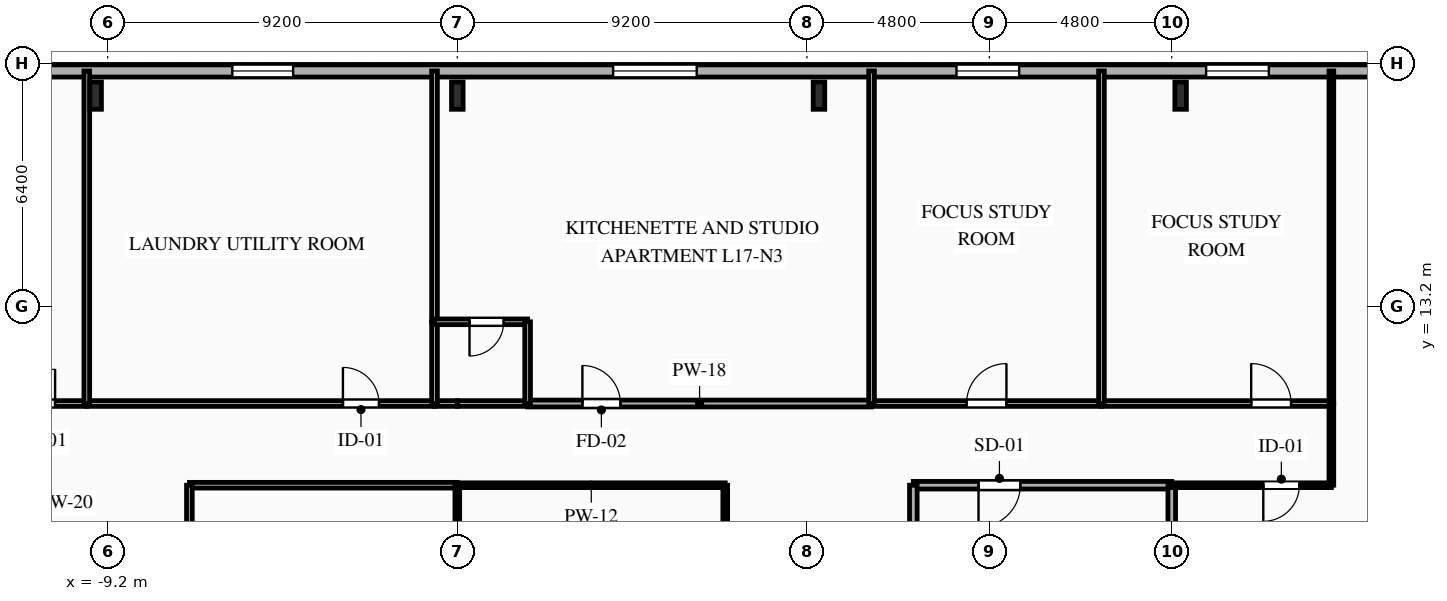
"""IFC4 building model, lengths in metres.
Left out: names, types, materials, properties, quantities, classifications, styles, units other than length and angle.
Written with IfcOpenShell. Run it as: python <this file> out.ifc"""

import sys

from ifc_helpers import new_model, si_unit, direction, frame, frame_2d, origin, origin_2d, place, context, subcontext, project, spatial, rectangle, i_section, extrude, element, fill, save


model = new_model("IFC4")
c1 = context("Model", 3, precision=1e-05, world=origin(), true_north=direction((0.0, 1.0)))
c2 = subcontext(c1, "Body", "Model", "MODEL_VIEW")
j1 = project(units=[si_unit("LENGTHUNIT", "METRE"), si_unit("PLANEANGLEUNIT", "RADIAN")], contexts=[c1])
p1 = place(None, origin())
s1 = spatial("IfcSite", under=j1, at=p1, CompositionType="ELEMENT")
p2 = place(p1, origin())
s2 = spatial("IfcBuilding", under=s1, at=p2, CompositionType="ELEMENT")
p3 = place(p2, frame((0.0, 0.0, 63.85)))
s3 = spatial("IfcBuildingStorey", under=s2, at=p3, CompositionType="ELEMENT", Elevation=63.85)
for number, where, z_axis, x_axis in (
    (1, (19.033, 18.75, 0.0), (0.0, 0.0, 1.0), (1.0, 0.0, 0.0)),
    (2, (9.517, 18.75, 0.0), (0.0, 0.0, 1.0), (1.0, 0.0, 0.0)),
    (3, (0.0, 18.75, 0.0), (0.0, 0.0, 1.0), (1.0, 0.0, 0.0)),
    (4, (-9.517, 18.75, 0.0), (0.0, 0.0, 1.0), (1.0, 0.0, 0.0)),
):
    element("IfcColumn", number, at=place(p3, frame(where, z_axis=z_axis, x_axis=x_axis)), inside=s3, PredefinedType="COLUMN", context=c2, shape_type="SweptSolid", body=[
        extrude(i_section(OverallWidth=0.304, OverallDepth=0.716, WebThickness=0.021, FlangeThickness=0.04, FilletRadius=0.027, at=origin_2d()), origin(), (0.0, 0.0, 1.0), 3.35),
    ])
p4 = place(p3, frame((-29.2, 19.4, 0.0), z_axis=(0.0, 0.0, 1.0), x_axis=(1.0, 0.0, 0.0)))
e5 = element("IfcWall", 5, at=p4, inside=s3, PredefinedType="SOLIDWALL", context=c2, shape_type="SweptSolid", body=[
    extrude(rectangle(XDim=58.4, YDim=0.32, at=frame_2d((29.2, 0.0))), origin(), (0.0, 0.0, 1.0), 3.035),
])
p5 = place(p4, frame((1.255, 0.0, 0.85)))
e6 = element("IfcOpeningElement", 6, at=p5, cuts=e5, PredefinedType="OPENING", context=c2, shape_type="SweptSolid", body=[
    extrude(rectangle(XDim=1.65, YDim=1.85, at=frame_2d((0.825, 0.925))), frame((0.0, 0.17, 0.0), z_axis=(0.0, -1.0, 0.0), x_axis=(1.0, 0.0, 0.0)), (0.0, 0.0, 1.0), 0.34),
])
p6 = place(p4, frame((4.26, 0.0, 0.85)))
e7 = element("IfcOpeningElement", 7, at=p6, cuts=e5, PredefinedType="OPENING", context=c2, shape_type="SweptSolid", body=[
    extrude(rectangle(XDim=1.4, YDim=1.85, at=frame_2d((0.7, 0.925))), frame((0.0, 0.17, 0.0), z_axis=(0.0, -1.0, 0.0), x_axis=(1.0, 0.0, 0.0)), (0.0, 0.0, 1.0), 0.34),
])
p7 = place(p4, frame((8.135, 0.0, 0.85)))
e8 = element("IfcOpeningElement", 8, at=p7, cuts=e5, PredefinedType="OPENING", context=c2, shape_type="SweptSolid", body=[
    extrude(rectangle(XDim=1.65, YDim=1.85, at=frame_2d((0.825, 0.925))), frame((0.0, 0.17, 0.0), z_axis=(0.0, -1.0, 0.0), x_axis=(1.0, 0.0, 0.0)), (0.0, 0.0, 1.0), 0.34),
])
p8 = place(p4, frame((13.575, 0.0, 0.85)))
e9 = element("IfcOpeningElement", 9, at=p8, cuts=e5, PredefinedType="OPENING", context=c2, shape_type="SweptSolid", body=[
    extrude(rectangle(XDim=1.65, YDim=1.85, at=frame_2d((0.825, 0.925))), frame((0.0, 0.17, 0.0), z_axis=(0.0, -1.0, 0.0), x_axis=(1.0, 0.0, 0.0)), (0.0, 0.0, 1.0), 0.34),
])
p9 = place(p4, frame((23.28, 0.0, 0.85)))
e10 = element("IfcOpeningElement", 10, at=p9, cuts=e5, PredefinedType="OPENING", context=c2, shape_type="SweptSolid", body=[
    extrude(rectangle(XDim=1.6, YDim=1.85, at=frame_2d((0.8, 0.925))), frame((0.0, 0.17, 0.0), z_axis=(0.0, -1.0, 0.0), x_axis=(1.0, 0.0, 0.0)), (0.0, 0.0, 1.0), 0.34),
])
p10 = place(p4, frame((33.3, 0.0, 0.85)))
e11 = element("IfcOpeningElement", 11, at=p10, cuts=e5, PredefinedType="OPENING", context=c2, shape_type="SweptSolid", body=[
    extrude(rectangle(XDim=2.2, YDim=1.85, at=frame_2d((1.1, 0.925))), frame((0.0, 0.17, 0.0), z_axis=(0.0, -1.0, 0.0), x_axis=(1.0, 0.0, 0.0)), (0.0, 0.0, 1.0), 0.34),
])
p11 = place(p4, frame((42.335, 0.0, 0.85)))
e12 = element("IfcOpeningElement", 12, at=p11, cuts=e5, PredefinedType="OPENING", context=c2, shape_type="SweptSolid", body=[
    extrude(rectangle(XDim=1.65, YDim=1.85, at=frame_2d((0.825, 0.925))), frame((0.0, 0.17, 0.0), z_axis=(0.0, -1.0, 0.0), x_axis=(1.0, 0.0, 0.0)), (0.0, 0.0, 1.0), 0.34),
])
p12 = place(p4, frame((48.905, 0.0, 0.85)))
e13 = element("IfcOpeningElement", 13, at=p12, cuts=e5, PredefinedType="OPENING", context=c2, shape_type="SweptSolid", body=[
    extrude(rectangle(XDim=1.65, YDim=1.85, at=frame_2d((0.825, 0.925))), frame((0.0, 0.17, 0.0), z_axis=(0.0, -1.0, 0.0), x_axis=(1.0, 0.0, 0.0)), (0.0, 0.0, 1.0), 0.34),
])
p13 = place(p4, frame((54.32, 0.0, 0.85)))
e14 = element("IfcOpeningElement", 14, at=p13, cuts=e5, PredefinedType="OPENING", context=c2, shape_type="SweptSolid", body=[
    extrude(rectangle(XDim=1.6, YDim=1.85, at=frame_2d((0.8, 0.925))), frame((0.0, 0.17, 0.0), z_axis=(0.0, -1.0, 0.0), x_axis=(1.0, 0.0, 0.0)), (0.0, 0.0, 1.0), 0.34),
])
p14 = place(p3, frame((18.8, 8.5, 0.0), z_axis=(0.0, 0.0, 1.0), x_axis=(-1.0, 0.0, 0.0)))
e15 = element("IfcWall", 15, at=p14, inside=s3, PredefinedType="PARTITIONING", context=c2, shape_type="SweptSolid", body=[
    extrude(rectangle(XDim=6.8, YDim=0.2, at=frame_2d((3.4, 0.0))), origin(), (0.0, 0.0, 1.0), 3.035),
])
p15 = place(p14, frame((3.985, 0.0, 0.0)))
e16 = element("IfcOpeningElement", 16, at=p15, cuts=e15, PredefinedType="OPENING", context=c2, shape_type="SweptSolid", body=[
    extrude(rectangle(XDim=1.1, YDim=2.15, at=frame_2d((0.55, 1.075))), frame((0.0, 0.11, 0.0), z_axis=(0.0, -1.0, 0.0), x_axis=(1.0, 0.0, 0.0)), (0.0, 0.0, 1.0), 0.22),
])
p16 = place(p3, frame((12.0, 8.5, 0.0), z_axis=(0.0, 0.0, 1.0), x_axis=(0.0, -1.0, 0.0)))
e17 = element("IfcWall", 17, at=p16, inside=s3, PredefinedType="PARTITIONING", context=c2, shape_type="SweptSolid", body=[
    extrude(rectangle(XDim=2.9, YDim=0.2, at=frame_2d((1.45, 0.0))), origin(), (0.0, 0.0, 1.0), 3.035),
])
p17 = place(p3, frame((18.8, 5.6, 0.0), z_axis=(0.0, 0.0, 1.0), x_axis=(0.0, 1.0, 0.0)))
e18 = element("IfcWall", 18, at=p17, inside=s3, PredefinedType="PARTITIONING", context=c2, shape_type="SweptSolid", body=[
    extrude(rectangle(XDim=2.9, YDim=0.2, at=frame_2d((1.45, 0.0))), origin(), (0.0, 0.0, 1.0), 2.52),
])
p18 = place(p3, frame((-12.1, 10.65, 0.0), z_axis=(0.0, 0.0, 1.0), x_axis=(1.0, 0.0, 0.0)))
e19 = element("IfcWall", 19, at=p18, inside=s3, PredefinedType="PLUMBINGWALL", context=c2, shape_type="SweptSolid", body=[
    extrude(rectangle(XDim=2.35, YDim=0.15, at=frame_2d((1.175, 0.0))), origin(), (0.0, 0.0, 1.0), 3.035),
])
p19 = place(p18, frame((0.616, 0.0, 0.0)))
e20 = element("IfcOpeningElement", 20, at=p19, cuts=e19, PredefinedType="OPENING", context=c2, shape_type="SweptSolid", body=[
    extrude(rectangle(XDim=0.9, YDim=2.1, at=frame_2d((0.45, 1.05))), frame((0.0, 0.085, 0.0), z_axis=(0.0, -1.0, 0.0), x_axis=(1.0, 0.0, 0.0)), (0.0, 0.0, 1.0), 0.17),
])
p20 = place(p3, frame((-9.75, 10.65, 0.0), z_axis=(0.0, 0.0, 1.0), x_axis=(1.0, 0.0, 0.0)))
e21 = element("IfcWall", 21, at=p20, inside=s3, PredefinedType="PARTITIONING", context=c2, shape_type="SweptSolid", body=[
    extrude(rectangle(XDim=9.15, YDim=0.15, at=frame_2d((4.575, 0.0))), origin(), (0.0, 0.0, 1.0), 3.035),
])
p21 = place(p20, frame((6.74, 0.0, 0.0)))
e22 = element("IfcOpeningElement", 22, at=p21, cuts=e21, PredefinedType="OPENING", context=c2, shape_type="SweptSolid", body=[
    extrude(rectangle(XDim=0.95, YDim=2.1, at=frame_2d((0.475, 1.05))), frame((0.0, 0.085, 0.0), z_axis=(0.0, -1.0, 0.0), x_axis=(1.0, 0.0, 0.0)), (0.0, 0.0, 1.0), 0.17),
])
p22 = place(p3, frame((-0.6, 10.65, 0.0), z_axis=(0.0, 0.0, 1.0), x_axis=(1.0, 0.0, 0.0)))
e23 = element("IfcWall", 23, at=p22, inside=s3, PredefinedType="PLUMBINGWALL", context=c2, shape_type="SweptSolid", body=[
    extrude(rectangle(XDim=0.6, YDim=0.15, at=frame_2d((0.3, 0.0))), origin(), (0.0, 0.0, 1.0), 3.035),
])
p23 = place(p3, frame((0.0, 8.5, 0.0), z_axis=(0.0, 0.0, 1.0), x_axis=(-1.0, 0.0, 0.0)))
e24 = element("IfcWall", 24, at=p23, inside=s3, PredefinedType="PARTITIONING", context=c2, shape_type="SweptSolid", body=[
    extrude(rectangle(XDim=7.05, YDim=0.15, at=frame_2d((3.525, 0.0))), origin(), (0.0, 0.0, 1.0), 3.035),
])
p24 = place(p3, frame((23.0, 8.5, 0.0), z_axis=(0.0, 0.0, 1.0), x_axis=(-1.0, 0.0, 0.0)))
e25 = element("IfcWall", 25, at=p24, inside=s3, PredefinedType="PARTITIONING", context=c2, shape_type="SweptSolid", body=[
    extrude(rectangle(XDim=4.2, YDim=0.125, at=frame_2d((2.1, 0.0))), origin(), (0.0, 0.0, 1.0), 3.035),
])
p25 = place(p24, frame((0.841, 0.0, 0.0)))
e26 = element("IfcOpeningElement", 26, at=p25, cuts=e25, PredefinedType="OPENING", context=c2, shape_type="SweptSolid", body=[
    extrude(rectangle(XDim=0.95, YDim=2.1, at=frame_2d((0.475, 1.05))), frame((0.0, 0.073, 0.0), z_axis=(0.0, -1.0, 0.0), x_axis=(1.0, 0.0, 0.0)), (0.0, 0.0, 1.0), 0.145),
])
p26 = place(p3, frame((23.0, 10.65, 0.0), z_axis=(0.0, 0.0, 1.0), x_axis=(0.0, -1.0, 0.0)))
e27 = element("IfcWall", 27, at=p26, inside=s3, PredefinedType="PARTITIONING", context=c2, shape_type="SweptSolid", body=[
    extrude(rectangle(XDim=2.15, YDim=0.125, at=frame_2d((1.075, 0.0))), origin(), (0.0, 0.0, 1.0), 3.035),
])
p27 = place(p3, frame((1.85, 10.65, 0.0), z_axis=(0.0, 0.0, 1.0), x_axis=(1.0, 0.0, 0.0)))
e28 = element("IfcWall", 28, at=p27, inside=s3, PredefinedType="PARTITIONING", context=c2, shape_type="SweptSolid", body=[
    extrude(rectangle(XDim=9.05, YDim=0.18, at=frame_2d((4.525, 0.0))), origin(), (0.0, 0.0, 1.0), 3.035),
])
p28 = place(p27, frame((1.441, 0.0, 0.0)))
e29 = element("IfcOpeningElement", 29, at=p28, cuts=e28, PredefinedType="OPENING", context=c2, shape_type="SweptSolid", body=[
    extrude(rectangle(XDim=1.0, YDim=2.15, at=frame_2d((0.5, 1.075))), frame((0.0, 0.1, 0.0), z_axis=(0.0, -1.0, 0.0), x_axis=(1.0, 0.0, 0.0)), (0.0, 0.0, 1.0), 0.2),
])
p29 = place(p3, frame((0.0, 10.65, 0.0), z_axis=(0.0, 0.0, 1.0), x_axis=(1.0, 0.0, 0.0)))
e30 = element("IfcWall", 30, at=p29, inside=s3, PredefinedType="PLUMBINGWALL", context=c2, shape_type="SweptSolid", body=[
    extrude(rectangle(XDim=1.85, YDim=0.15, at=frame_2d((0.925, 0.0))), origin(), (0.0, 0.0, 1.0), 3.035),
])
p30 = place(p3, frame((10.9, 10.65, 0.0), z_axis=(0.0, 0.0, 1.0), x_axis=(1.0, 0.0, 0.0)))
e31 = element("IfcWall", 31, at=p30, inside=s3, PredefinedType="PARTITIONING", context=c2, shape_type="SweptSolid", body=[
    extrude(rectangle(XDim=6.05, YDim=0.15, at=frame_2d((3.025, 0.0))), origin(), (0.0, 0.0, 1.0), 3.035),
])
p31 = place(p30, frame((2.5, 0.0, 0.0)))
e32 = element("IfcOpeningElement", 32, at=p31, cuts=e31, PredefinedType="OPENING", context=c2, shape_type="SweptSolid", body=[
    extrude(rectangle(XDim=1.05, YDim=2.15, at=frame_2d((0.525, 1.075))), frame((0.0, 0.085, 0.0), z_axis=(0.0, -1.0, 0.0), x_axis=(1.0, 0.0, 0.0)), (0.0, 0.0, 1.0), 0.17),
])
p32 = place(p3, frame((16.95, 10.65, 0.0), z_axis=(0.0, 0.0, 1.0), x_axis=(1.0, 0.0, 0.0)))
e33 = element("IfcWall", 33, at=p32, inside=s3, PredefinedType="PARTITIONING", context=c2, shape_type="SweptSolid", body=[
    extrude(rectangle(XDim=6.05, YDim=0.15, at=frame_2d((3.025, 0.0))), origin(), (0.0, 0.0, 1.0), 3.035),
])
p33 = place(p32, frame((3.94, 0.0, 0.0)))
e34 = element("IfcOpeningElement", 34, at=p33, cuts=e33, PredefinedType="OPENING", context=c2, shape_type="SweptSolid", body=[
    extrude(rectangle(XDim=1.05, YDim=2.15, at=frame_2d((0.525, 1.075))), frame((0.0, 0.085, 0.0), z_axis=(0.0, -1.0, 0.0), x_axis=(1.0, 0.0, 0.0)), (0.0, 0.0, 1.0), 0.17),
])
p34 = place(p3, frame((7.05, 8.5, 0.0), z_axis=(0.0, 0.0, 1.0), x_axis=(-1.0, 0.0, 0.0)))
e35 = element("IfcWall", 35, at=p34, inside=s3, PredefinedType="PARTITIONING", context=c2, shape_type="SweptSolid", body=[
    extrude(rectangle(XDim=7.05, YDim=0.125, at=frame_2d((3.525, 0.0))), origin(), (0.0, 0.0, 1.0), 3.035),
])
p35 = place(p3, frame((-7.05, 8.5, 0.0), z_axis=(0.0, 0.0, 1.0), x_axis=(0.0, -1.0, 0.0)))
e36 = element("IfcWall", 36, at=p35, inside=s3, PredefinedType="PARTITIONING", context=c2, shape_type="SweptSolid", body=[
    extrude(rectangle(XDim=14.1, YDim=0.15, at=frame_2d((7.05, 0.0))), origin(), (0.0, 0.0, 1.0), 3.035),
])
p36 = place(p35, frame((8.074, 0.0, 0.0)))
e37 = element("IfcOpeningElement", 37, at=p36, cuts=e36, PredefinedType="OPENING", context=c2, shape_type="SweptSolid", body=[
    extrude(rectangle(XDim=0.95, YDim=2.1, at=frame_2d((0.475, 1.05))), frame((0.0, 0.085, 0.0), z_axis=(0.0, -1.0, 0.0), x_axis=(1.0, 0.0, 0.0)), (0.0, 0.0, 1.0), 0.17),
])
p37 = place(p3, frame((7.05, -5.6, 0.0), z_axis=(0.0, 0.0, 1.0), x_axis=(0.0, 1.0, 0.0)))
e38 = element("IfcWall", 38, at=p37, inside=s3, PredefinedType="PARTITIONING", context=c2, shape_type="SweptSolid", body=[
    extrude(rectangle(XDim=14.1, YDim=0.125, at=frame_2d((7.05, 0.0))), origin(), (0.0, 0.0, 1.0), 3.035),
])
p38 = place(p37, frame((5.076, 0.0, 0.0)))
e39 = element("IfcOpeningElement", 39, at=p38, cuts=e38, PredefinedType="OPENING", context=c2, shape_type="SweptSolid", body=[
    extrude(rectangle(XDim=0.95, YDim=2.1, at=frame_2d((0.475, 1.05))), frame((0.0, 0.073, 0.0), z_axis=(0.0, -1.0, 0.0), x_axis=(1.0, 0.0, 0.0)), (0.0, 0.0, 1.0), 0.145),
])
p39 = place(p3, frame((23.0, 10.65, 0.0), z_axis=(0.0, 0.0, 1.0), x_axis=(0.0, 1.0, 0.0)))
e40 = element("IfcWall", 40, at=p39, inside=s3, PredefinedType="PARTITIONING", context=c2, shape_type="SweptSolid", body=[
    extrude(rectangle(XDim=8.75, YDim=0.125, at=frame_2d((4.375, 0.0))), origin(), (0.0, 0.0, 1.0), 3.035),
])
p40 = place(p3, frame((-9.75, 19.4, 0.0), z_axis=(0.0, 0.0, 1.0), x_axis=(0.0, -1.0, 0.0)))
e41 = element("IfcWall", 41, at=p40, inside=s3, PredefinedType="PLUMBINGWALL", context=c2, shape_type="SweptSolid", body=[
    extrude(rectangle(XDim=8.75, YDim=0.15, at=frame_2d((4.375, 0.0))), origin(), (0.0, 0.0, 1.0), 3.035),
])
p41 = place(p3, frame((-0.6, 19.4, 0.0), z_axis=(0.0, 0.0, 1.0), x_axis=(0.0, -1.0, 0.0)))
e42 = element("IfcWall", 42, at=p41, inside=s3, PredefinedType="PARTITIONING", context=c2, shape_type="SweptSolid", body=[
    extrude(rectangle(XDim=6.6, YDim=0.15, at=frame_2d((3.3, 0.0))), origin(), (0.0, 0.0, 1.0), 3.035),
])
p42 = place(p3, frame((-0.6, 12.8, 0.0), z_axis=(0.0, 0.0, 1.0), x_axis=(0.0, -1.0, 0.0)))
e43 = element("IfcWall", 43, at=p42, inside=s3, PredefinedType="PLUMBINGWALL", context=c2, shape_type="SweptSolid", body=[
    extrude(rectangle(XDim=2.15, YDim=0.15, at=frame_2d((1.075, 0.0))), origin(), (0.0, 0.0, 1.0), 3.035),
])
p43 = place(p3, frame((1.85, 12.8, 0.0), z_axis=(0.0, 0.0, 1.0), x_axis=(-1.0, 0.0, 0.0)))
e44 = element("IfcWall", 44, at=p43, inside=s3, PredefinedType="PLUMBINGWALL", context=c2, shape_type="SweptSolid", body=[
    extrude(rectangle(XDim=2.45, YDim=0.15, at=frame_2d((1.225, 0.0))), origin(), (0.0, 0.0, 1.0), 3.035),
])
p44 = place(p43, frame((0.629, 0.0, 0.0)))
e45 = element("IfcOpeningElement", 45, at=p44, cuts=e44, PredefinedType="OPENING", context=c2, shape_type="SweptSolid", body=[
    extrude(rectangle(XDim=0.9, YDim=2.1, at=frame_2d((0.45, 1.05))), frame((0.0, 0.085, 0.0), z_axis=(0.0, -1.0, 0.0), x_axis=(1.0, 0.0, 0.0)), (0.0, 0.0, 1.0), 0.17),
])
p45 = place(p3, frame((1.85, 10.65, 0.0), z_axis=(0.0, 0.0, 1.0), x_axis=(0.0, 1.0, 0.0)))
e46 = element("IfcWall", 46, at=p45, inside=s3, PredefinedType="PLUMBINGWALL", context=c2, shape_type="SweptSolid", body=[
    extrude(rectangle(XDim=2.15, YDim=0.15, at=frame_2d((1.075, 0.0))), origin(), (0.0, 0.0, 1.0), 3.035),
])
for number, where, z_axis, x_axis in (
    (47, (10.9, 19.4, 0.0), (0.0, 0.0, 1.0), (0.0, -1.0, 0.0)),
    (48, (16.95, 19.4, 0.0), (0.0, 0.0, 1.0), (0.0, -1.0, 0.0)),
):
    element("IfcWall", number, at=place(p3, frame(where, z_axis=z_axis, x_axis=x_axis)), inside=s3, PredefinedType="PARTITIONING", context=c2, shape_type="SweptSolid", body=[
        extrude(rectangle(XDim=8.75, YDim=0.15, at=frame_2d((4.375, 0.0))), origin(), (0.0, 0.0, 1.0), 3.035),
    ])
p46 = place(p3, frame((0.0, 8.5, 0.0), z_axis=(0.0, 0.0, 1.0), x_axis=(0.0, -1.0, 0.0)))
e49 = element("IfcWall", 49, at=p46, inside=s3, PredefinedType="PARTITIONING", context=c2, shape_type="SweptSolid", body=[
    extrude(rectangle(XDim=14.1, YDim=0.125, at=frame_2d((7.05, 0.0))), origin(), (0.0, 0.0, 1.0), 3.035),
])
p47 = place(p9, origin())
e50 = element("IfcWindow", 50, at=p47, inside=s3, PartitioningType="SINGLE_PANEL", PredefinedType="WINDOW", context=c2, shape_type="SweptSolid", body=[
    extrude(rectangle(XDim=1.6, YDim=1.85, at=frame_2d((0.8, 0.925))), frame((0.0, 0.03, 0.0), z_axis=(0.0, -1.0, 0.0), x_axis=(1.0, 0.0, 0.0)), (0.0, 0.0, 1.0), 0.06),
])
fill(e10, e50)
p48 = place(p10, origin())
e51 = element("IfcWindow", 51, at=p48, inside=s3, PartitioningType="SINGLE_PANEL", PredefinedType="WINDOW", context=c2, shape_type="SweptSolid", body=[
    extrude(rectangle(XDim=2.2, YDim=1.85, at=frame_2d((1.1, 0.925))), frame((0.0, 0.03, 0.0), z_axis=(0.0, -1.0, 0.0), x_axis=(1.0, 0.0, 0.0)), (0.0, 0.0, 1.0), 0.06),
])
fill(e11, e51)
p49 = place(p11, origin())
e52 = element("IfcWindow", 52, at=p49, inside=s3, PartitioningType="SINGLE_PANEL", PredefinedType="WINDOW", context=c2, shape_type="SweptSolid", body=[
    extrude(rectangle(XDim=1.65, YDim=1.85, at=frame_2d((0.825, 0.925))), frame((0.0, 0.03, 0.0), z_axis=(0.0, -1.0, 0.0), x_axis=(1.0, 0.0, 0.0)), (0.0, 0.0, 1.0), 0.06),
])
fill(e12, e52)
p50 = place(p12, origin())
e53 = element("IfcWindow", 53, at=p50, inside=s3, PartitioningType="SINGLE_PANEL", PredefinedType="WINDOW", context=c2, shape_type="SweptSolid", body=[
    extrude(rectangle(XDim=1.65, YDim=1.85, at=frame_2d((0.825, 0.925))), frame((0.0, 0.03, 0.0), z_axis=(0.0, -1.0, 0.0), x_axis=(1.0, 0.0, 0.0)), (0.0, 0.0, 1.0), 0.06),
])
fill(e13, e53)
p51 = place(p15, origin())
e54 = element("IfcDoor", 54, at=p51, inside=s3, OperationType="SINGLE_SWING_RIGHT", PredefinedType="DOOR", context=c2, shape_type="SweptSolid", body=[
    extrude(rectangle(XDim=1.1, YDim=2.15, at=frame_2d((0.55, 1.075))), frame((0.0, 0.025, 0.0), z_axis=(0.0, -1.0, 0.0), x_axis=(1.0, 0.0, 0.0)), (0.0, 0.0, 1.0), 0.05),
])
fill(e16, e54)
p52 = place(p19, origin())
e55 = element("IfcDoor", 55, at=p52, inside=s3, OperationType="SINGLE_SWING_RIGHT", PredefinedType="DOOR", context=c2, shape_type="SweptSolid", body=[
    extrude(rectangle(XDim=0.9, YDim=2.1, at=frame_2d((0.45, 1.05))), frame((0.0, 0.025, 0.0), z_axis=(0.0, -1.0, 0.0), x_axis=(1.0, 0.0, 0.0)), (0.0, 0.0, 1.0), 0.05),
])
fill(e20, e55)
p53 = place(p21, origin())
e56 = element("IfcDoor", 56, at=p53, inside=s3, OperationType="SINGLE_SWING_LEFT", PredefinedType="DOOR", context=c2, shape_type="SweptSolid", body=[
    extrude(rectangle(XDim=0.95, YDim=2.1, at=frame_2d((0.475, 1.05))), frame((0.0, 0.025, 0.0), z_axis=(0.0, -1.0, 0.0), x_axis=(1.0, 0.0, 0.0)), (0.0, 0.0, 1.0), 0.05),
])
fill(e22, e56)
p54 = place(p25, origin())
e57 = element("IfcDoor", 57, at=p54, inside=s3, OperationType="SINGLE_SWING_RIGHT", PredefinedType="DOOR", context=c2, shape_type="SweptSolid", body=[
    extrude(rectangle(XDim=0.95, YDim=2.1, at=frame_2d((0.475, 1.05))), frame((0.0, 0.025, 0.0), z_axis=(0.0, -1.0, 0.0), x_axis=(1.0, 0.0, 0.0)), (0.0, 0.0, 1.0), 0.05),
])
fill(e26, e57)
p55 = place(p28, origin())
e58 = element("IfcDoor", 58, at=p55, inside=s3, OperationType="SINGLE_SWING_LEFT", PredefinedType="DOOR", context=c2, shape_type="SweptSolid", body=[
    extrude(rectangle(XDim=1.0, YDim=2.15, at=frame_2d((0.5, 1.075))), frame((0.0, 0.025, 0.0), z_axis=(0.0, -1.0, 0.0), x_axis=(1.0, 0.0, 0.0)), (0.0, 0.0, 1.0), 0.05),
])
fill(e29, e58)
p56 = place(p31, origin())
e59 = element("IfcDoor", 59, at=p56, inside=s3, OperationType="SINGLE_SWING_RIGHT", PredefinedType="DOOR", context=c2, shape_type="SweptSolid", body=[
    extrude(rectangle(XDim=1.05, YDim=2.15, at=frame_2d((0.525, 1.075))), frame((0.0, 0.025, 0.0), z_axis=(0.0, -1.0, 0.0), x_axis=(1.0, 0.0, 0.0)), (0.0, 0.0, 1.0), 0.05),
])
fill(e32, e59)
p57 = place(p33, origin())
e60 = element("IfcDoor", 60, at=p57, inside=s3, OperationType="SINGLE_SWING_LEFT", PredefinedType="DOOR", context=c2, shape_type="SweptSolid", body=[
    extrude(rectangle(XDim=1.05, YDim=2.15, at=frame_2d((0.525, 1.075))), frame((0.0, 0.025, 0.0), z_axis=(0.0, -1.0, 0.0), x_axis=(1.0, 0.0, 0.0)), (0.0, 0.0, 1.0), 0.05),
])
fill(e34, e60)
p58 = place(p44, origin())
e61 = element("IfcDoor", 61, at=p58, inside=s3, OperationType="SINGLE_SWING_RIGHT", PredefinedType="DOOR", context=c2, shape_type="SweptSolid", body=[
    extrude(rectangle(XDim=0.9, YDim=2.1, at=frame_2d((0.45, 1.05))), frame((0.0, 0.025, 0.0), z_axis=(0.0, -1.0, 0.0), x_axis=(1.0, 0.0, 0.0)), (0.0, 0.0, 1.0), 0.05),
])
fill(e45, e61)
save(model, sys.argv[1])
